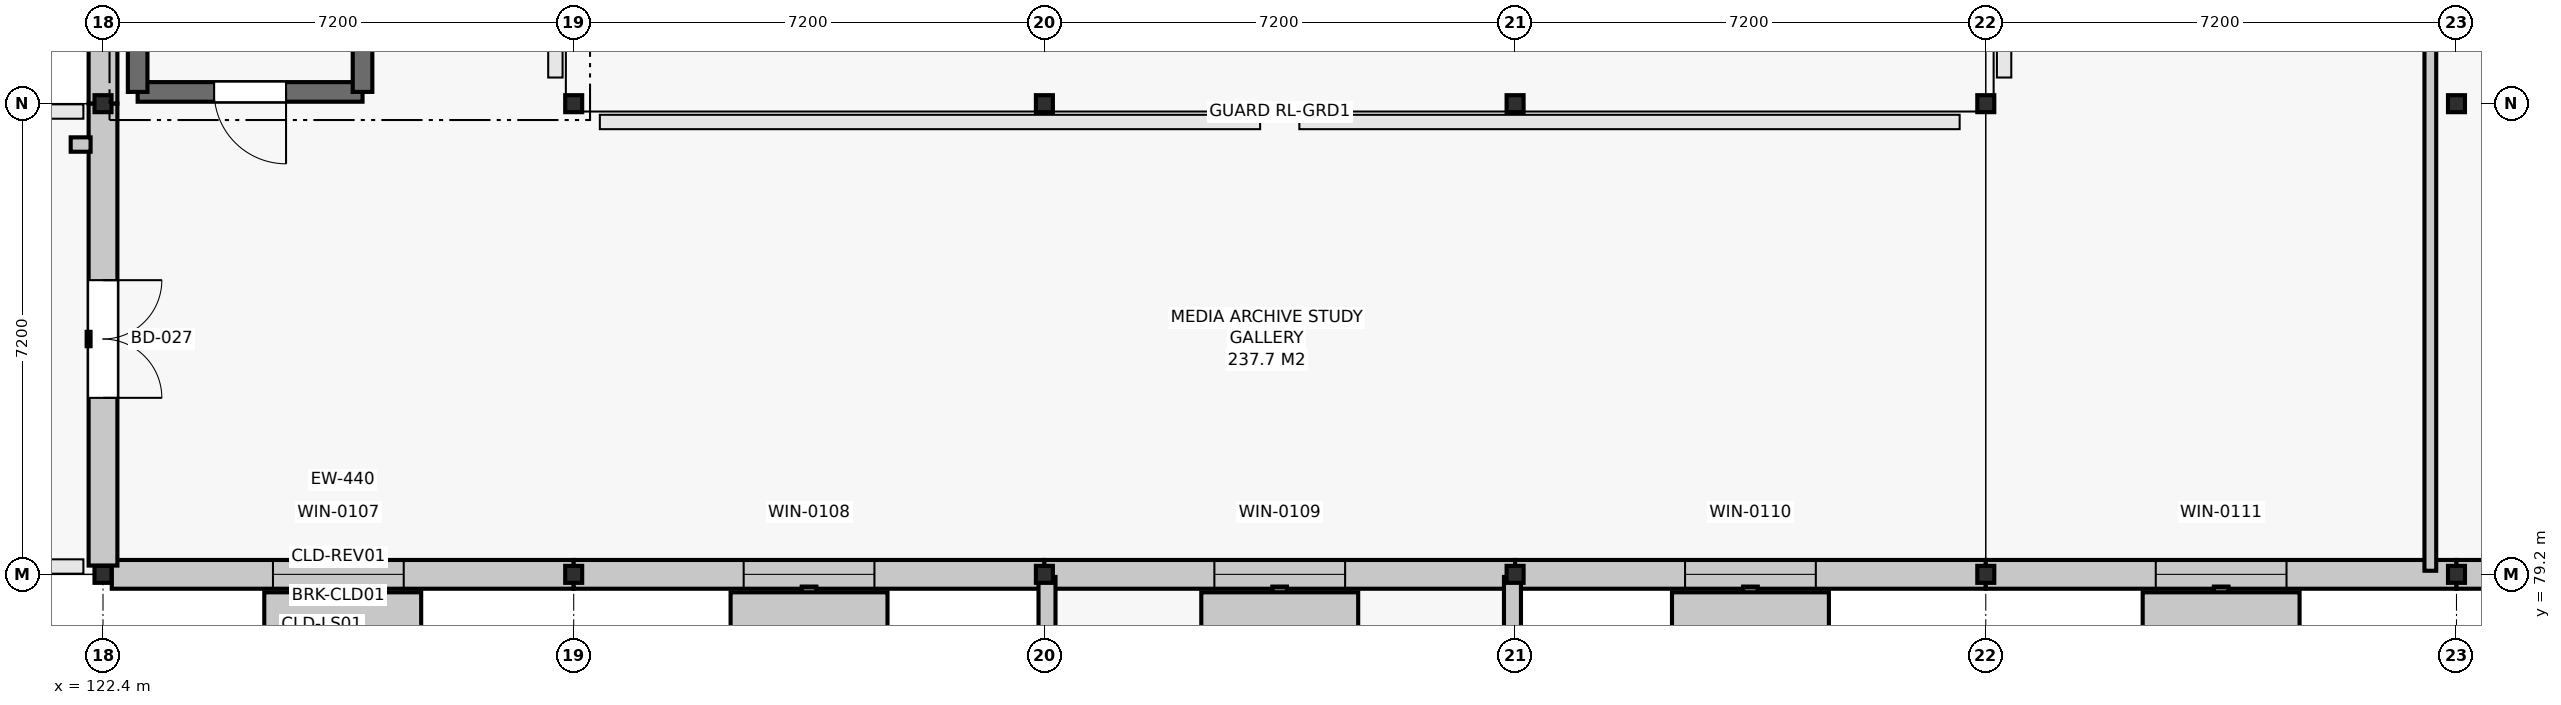
"""IFC4 building model, lengths in metres.
Left out: names, types, materials, properties, quantities, classifications, styles, units other than length and angle.
Written with IfcOpenShell. Run it as: python <this file> out.ifc"""

import sys

from ifc_helpers import new_model, si_unit, direction, frame, frame_2d, origin, origin_2d, place, context, subcontext, project, spatial, rectangle, i_section, extrude, element, fill, save


model = new_model("IFC4")
c1 = context("Model", 3, precision=1e-05, world=origin(), true_north=direction((0.0, 1.0)))
c2 = subcontext(c1, "Body", "Model", "MODEL_VIEW")
j1 = project(units=[si_unit("LENGTHUNIT", "METRE"), si_unit("PLANEANGLEUNIT", "RADIAN")], contexts=[c1])
p1 = place(None, origin())
s1 = spatial("IfcSite", under=j1, at=p1, CompositionType="ELEMENT")
p2 = place(p1, origin())
s2 = spatial("IfcBuilding", under=s1, at=p2, CompositionType="ELEMENT")
p3 = place(p2, frame((0.0, 0.0, 10.2)))
s3 = spatial("IfcBuildingStorey", under=s2, at=p3, CompositionType="ELEMENT", Elevation=10.2)
for number, where, z_axis, x_axis in (
    (1, (122.4, 79.2, 0.0), (0.0, 0.0, 1.0), (1.0, 0.0, 0.0)),
    (2, (122.4, 86.4, 0.0), (0.0, 0.0, 1.0), (1.0, 0.0, 0.0)),
    (3, (129.6, 79.2, 0.0), (0.0, 0.0, 1.0), (1.0, 0.0, 0.0)),
    (4, (129.6, 86.4, 0.0), (0.0, 0.0, 1.0), (1.0, 0.0, 0.0)),
    (5, (136.8, 79.2, 0.0), (0.0, 0.0, 1.0), (1.0, 0.0, 0.0)),
    (6, (136.8, 86.4, 0.0), (0.0, 0.0, 1.0), (1.0, 0.0, 0.0)),
    (7, (144.0, 79.2, 0.0), (0.0, 0.0, 1.0), (1.0, 0.0, 0.0)),
    (8, (144.0, 86.4, 0.0), (0.0, 0.0, 1.0), (1.0, 0.0, 0.0)),
    (9, (151.2, 79.2, 0.0), (0.0, 0.0, 1.0), (1.0, 0.0, 0.0)),
    (10, (151.2, 86.4, 0.0), (0.0, 0.0, 1.0), (1.0, 0.0, 0.0)),
    (11, (158.4, 79.2, 0.0), (0.0, 0.0, 1.0), (1.0, 0.0, 0.0)),
    (12, (158.4, 86.4, 0.0), (0.0, 0.0, 1.0), (1.0, 0.0, 0.0)),
):
    element("IfcColumn", number, at=place(p3, frame(where, z_axis=z_axis, x_axis=x_axis)), inside=s3, PredefinedType="COLUMN", context=c2, shape_type="SweptSolid", body=[
        extrude(i_section(OverallWidth=0.26, OverallDepth=0.26, WebThickness=0.01, FlangeThickness=0.018, FilletRadius=0.024, at=origin_2d()), origin(), (0.0, 0.0, 1.0), 4.2),
    ])
p4 = place(p3, frame((122.534, 79.2, 0.0), z_axis=(0.0, 0.0, 1.0), x_axis=(1.0, 0.0, 0.0)))
e13 = element("IfcWall", 13, at=p4, inside=s3, PredefinedType="SOLIDWALL", context=c2, shape_type="SweptSolid", body=[
    extrude(rectangle(XDim=7.066, YDim=0.44, at=frame_2d((3.533, 0.0))), origin(), (0.0, 0.0, 1.0), 3.24),
])
p5 = place(p4, frame((2.466, 0.0, 1.35)))
e14 = element("IfcOpeningElement", 14, at=p5, cuts=e13, PredefinedType="OPENING", context=c2, shape_type="SweptSolid", body=[
    extrude(rectangle(XDim=2.0, YDim=1.5, at=frame_2d((1.0, 0.75))), frame((0.0, 0.232, 0.0), z_axis=(0.0, -1.0, 0.0), x_axis=(1.0, 0.0, 0.0)), (0.0, 0.0, 1.0), 0.464),
])
p6 = place(p3, frame((129.6, 79.2, 0.0), z_axis=(0.0, 0.0, 1.0), x_axis=(1.0, 0.0, 0.0)))
e15 = element("IfcWall", 15, at=p6, inside=s3, PredefinedType="SOLIDWALL", context=c2, shape_type="SweptSolid", body=[
    extrude(rectangle(XDim=7.2, YDim=0.44, at=frame_2d((3.6, 0.0))), origin(), (0.0, 0.0, 1.0), 3.24),
])
p7 = place(p6, frame((2.6, 0.0, 1.35)))
e16 = element("IfcOpeningElement", 16, at=p7, cuts=e15, PredefinedType="OPENING", context=c2, shape_type="SweptSolid", body=[
    extrude(rectangle(XDim=2.0, YDim=1.5, at=frame_2d((1.0, 0.75))), frame((0.0, 0.232, 0.0), z_axis=(0.0, -1.0, 0.0), x_axis=(1.0, 0.0, 0.0)), (0.0, 0.0, 1.0), 0.464),
])
p8 = place(p3, frame((136.8, 79.2, 0.0), z_axis=(0.0, 0.0, 1.0), x_axis=(1.0, 0.0, 0.0)))
e17 = element("IfcWall", 17, at=p8, inside=s3, PredefinedType="SOLIDWALL", context=c2, shape_type="SweptSolid", body=[
    extrude(rectangle(XDim=7.2, YDim=0.44, at=frame_2d((3.6, 0.0))), origin(), (0.0, 0.0, 1.0), 3.24),
])
p9 = place(p8, frame((2.6, 0.0, 1.35)))
e18 = element("IfcOpeningElement", 18, at=p9, cuts=e17, PredefinedType="OPENING", context=c2, shape_type="SweptSolid", body=[
    extrude(rectangle(XDim=2.0, YDim=1.5, at=frame_2d((1.0, 0.75))), frame((0.0, 0.232, 0.0), z_axis=(0.0, -1.0, 0.0), x_axis=(1.0, 0.0, 0.0)), (0.0, 0.0, 1.0), 0.464),
])
p10 = place(p3, frame((144.0, 79.2, 0.0), z_axis=(0.0, 0.0, 1.0), x_axis=(1.0, 0.0, 0.0)))
e19 = element("IfcWall", 19, at=p10, inside=s3, PredefinedType="SOLIDWALL", context=c2, shape_type="SweptSolid", body=[
    extrude(rectangle(XDim=7.2, YDim=0.44, at=frame_2d((3.6, 0.0))), origin(), (0.0, 0.0, 1.0), 3.24),
])
p11 = place(p10, frame((2.6, 0.0, 1.35)))
e20 = element("IfcOpeningElement", 20, at=p11, cuts=e19, PredefinedType="OPENING", context=c2, shape_type="SweptSolid", body=[
    extrude(rectangle(XDim=2.0, YDim=1.5, at=frame_2d((1.0, 0.75))), frame((0.0, 0.232, 0.0), z_axis=(0.0, -1.0, 0.0), x_axis=(1.0, 0.0, 0.0)), (0.0, 0.0, 1.0), 0.464),
])
p12 = place(p3, frame((151.2, 79.2, 0.0), z_axis=(0.0, 0.0, 1.0), x_axis=(1.0, 0.0, 0.0)))
e21 = element("IfcWall", 21, at=p12, inside=s3, PredefinedType="SOLIDWALL", context=c2, shape_type="SweptSolid", body=[
    extrude(rectangle(XDim=7.2, YDim=0.44, at=frame_2d((3.6, 0.0))), origin(), (0.0, 0.0, 1.0), 3.24),
])
p13 = place(p12, frame((2.6, 0.0, 1.35)))
e22 = element("IfcOpeningElement", 22, at=p13, cuts=e21, PredefinedType="OPENING", context=c2, shape_type="SweptSolid", body=[
    extrude(rectangle(XDim=2.0, YDim=1.5, at=frame_2d((1.0, 0.75))), frame((0.0, 0.232, 0.0), z_axis=(0.0, -1.0, 0.0), x_axis=(1.0, 0.0, 0.0)), (0.0, 0.0, 1.0), 0.464),
])
p14 = place(p3, frame((158.4, 79.2, 0.0), z_axis=(0.0, 0.0, 1.0), x_axis=(1.0, 0.0, 0.0)))
e23 = element("IfcWall", 23, at=p14, inside=s3, PredefinedType="SOLIDWALL", context=c2, shape_type="SweptSolid", body=[
    extrude(rectangle(XDim=7.066, YDim=0.44, at=frame_2d((3.533, 0.0))), origin(), (0.0, 0.0, 1.0), 3.24),
])
p15 = place(p14, frame((2.6, 0.0, 1.35)))
e24 = element("IfcOpeningElement", 24, at=p15, cuts=e23, PredefinedType="OPENING", context=c2, shape_type="SweptSolid", body=[
    extrude(rectangle(XDim=2.0, YDim=1.5, at=frame_2d((1.0, 0.75))), frame((0.0, 0.232, 0.0), z_axis=(0.0, -1.0, 0.0), x_axis=(1.0, 0.0, 0.0)), (0.0, 0.0, 1.0), 0.464),
])
p16 = place(p3, frame((122.4, 93.6, 0.0), z_axis=(0.0, 0.0, 1.0), x_axis=(0.0, -1.0, 0.0)))
e25 = element("IfcWall", 25, at=p16, inside=s3, PredefinedType="SOLIDWALL", context=c2, shape_type="SweptSolid", body=[
    extrude(rectangle(XDim=7.2, YDim=0.44, at=frame_2d((3.6, 0.0))), origin(), (0.0, 0.0, 1.0), 3.24),
])
p17 = place(p16, frame((2.6, 0.0, 1.35)))
e26 = element("IfcOpeningElement", 26, at=p17, cuts=e25, PredefinedType="OPENING", context=c2, shape_type="SweptSolid", body=[
    extrude(rectangle(XDim=2.0, YDim=1.5, at=frame_2d((1.0, 0.75))), frame((0.0, 0.232, 0.0), z_axis=(0.0, -1.0, 0.0), x_axis=(1.0, 0.0, 0.0)), (0.0, 0.0, 1.0), 0.464),
])
p18 = place(p3, frame((122.4, 86.4, 0.0), z_axis=(0.0, 0.0, 1.0), x_axis=(0.0, -1.0, 0.0)))
e27 = element("IfcWall", 27, at=p18, inside=s3, PredefinedType="SOLIDWALL", context=c2, shape_type="SweptSolid", body=[
    extrude(rectangle(XDim=7.066, YDim=0.44, at=frame_2d((3.533, 0.0))), origin(), (0.0, 0.0, 1.0), 3.24),
])
p19 = place(p18, frame((2.7, 0.0, 0.0)))
e28 = element("IfcOpeningElement", 28, at=p19, cuts=e27, PredefinedType="OPENING", context=c2, shape_type="SweptSolid", body=[
    extrude(rectangle(XDim=1.8, YDim=2.3, at=frame_2d((0.9, 1.15))), frame((0.0, 0.232, 0.0), z_axis=(0.0, -1.0, 0.0), x_axis=(1.0, 0.0, 0.0)), (0.0, 0.0, 1.0), 0.464),
])
for number, where, z_axis, x_axis in (
    (29, (143.96, 50.44, 0.0), (0.0, 0.0, 1.0), (0.0, 1.0, 0.0)),
    (30, (136.84, 79.16, 0.0), (0.0, 0.0, 1.0), (0.0, -1.0, 0.0)),
):
    element("IfcWall", number, at=place(p3, frame(where, z_axis=z_axis, x_axis=x_axis)), inside=s3, PredefinedType="PARAPET", context=c2, shape_type="SweptSolid", body=[
        extrude(rectangle(XDim=28.72, YDim=0.26, at=frame_2d((14.36, 0.0))), origin(), (0.0, 0.0, 1.0), 0.9),
    ])
p20 = place(p3, frame((122.93, 86.58, 0.0), z_axis=(0.0, 0.0, 1.0), x_axis=(1.0, 0.0, 0.0)))
e31 = element("IfcWall", 31, at=p20, inside=s3, PredefinedType="SHEAR", context=c2, shape_type="SweptSolid", body=[
    extrude(rectangle(XDim=3.44, YDim=0.3, at=frame_2d((1.72, 0.0))), origin(), (0.0, 0.0, 1.0), 3.96),
])
p21 = place(p20, frame((1.17, 0.0, 0.0)))
e32 = element("IfcOpeningElement", 32, at=p21, cuts=e31, PredefinedType="OPENING", context=c2, shape_type="SweptSolid", body=[
    extrude(rectangle(XDim=1.1, YDim=2.15, at=frame_2d((0.55, 1.075))), frame((0.0, 0.162, 0.0), z_axis=(0.0, -1.0, 0.0), x_axis=(1.0, 0.0, 0.0)), (0.0, 0.0, 1.0), 0.324),
])
for number, where, z_axis, x_axis in (
    (33, (126.37, 86.58, 0.0), (0.0, 0.0, 1.0), (0.0, 1.0, 0.0)),
    (34, (122.93, 93.52, 0.0), (0.0, 0.0, 1.0), (0.0, -1.0, 0.0)),
):
    element("IfcWall", number, at=place(p3, frame(where, z_axis=z_axis, x_axis=x_axis)), inside=s3, PredefinedType="SHEAR", context=c2, shape_type="SweptSolid", body=[
        extrude(rectangle(XDim=6.94, YDim=0.3, at=frame_2d((3.47, 0.0))), origin(), (0.0, 0.0, 1.0), 3.96),
    ])
p22 = place(p3, frame((158.0, 79.255, 0.0), z_axis=(0.0, 0.0, 1.0), x_axis=(0.0, 1.0, 0.0)))
e35 = element("IfcWall", 35, at=p22, inside=s3, PredefinedType="PARTITIONING", context=c2, shape_type="SweptSolid", body=[
    extrude(rectangle(XDim=19.653, YDim=0.18, at=frame_2d((9.827, 0.0))), origin(), (0.0, 0.0, 1.0), 3.395),
])
p23 = place(p22, frame((12.739, 0.0, 0.0)))
e36 = element("IfcOpeningElement", 36, at=p23, cuts=e35, PredefinedType="OPENING", context=c2, shape_type="SweptSolid", body=[
    extrude(rectangle(XDim=1.08, YDim=2.2, at=frame_2d((0.54, 1.1))), frame((0.0, 0.102, 0.0), z_axis=(0.0, -1.0, 0.0), x_axis=(1.0, 0.0, 0.0)), (0.0, 0.0, 1.0), 0.204),
])
p24 = place(p5, origin())
e37 = element("IfcWindow", 37, at=p24, inside=s3, PartitioningType="SINGLE_PANEL", PredefinedType="WINDOW", context=c2, shape_type="SweptSolid", body=[
    extrude(rectangle(XDim=2.0, YDim=1.5, at=frame_2d((1.0, 0.75))), frame((0.0, 0.03, 0.0), z_axis=(0.0, -1.0, 0.0), x_axis=(1.0, 0.0, 0.0)), (0.0, 0.0, 1.0), 0.06),
])
fill(e14, e37)
p25 = place(p7, origin())
e38 = element("IfcWindow", 38, at=p25, inside=s3, PartitioningType="SINGLE_PANEL", PredefinedType="WINDOW", context=c2, shape_type="SweptSolid", body=[
    extrude(rectangle(XDim=2.0, YDim=1.5, at=frame_2d((1.0, 0.75))), frame((0.0, 0.03, 0.0), z_axis=(0.0, -1.0, 0.0), x_axis=(1.0, 0.0, 0.0)), (0.0, 0.0, 1.0), 0.06),
])
fill(e16, e38)
p26 = place(p9, origin())
e39 = element("IfcWindow", 39, at=p26, inside=s3, PartitioningType="SINGLE_PANEL", PredefinedType="WINDOW", context=c2, shape_type="SweptSolid", body=[
    extrude(rectangle(XDim=2.0, YDim=1.5, at=frame_2d((1.0, 0.75))), frame((0.0, 0.03, 0.0), z_axis=(0.0, -1.0, 0.0), x_axis=(1.0, 0.0, 0.0)), (0.0, 0.0, 1.0), 0.06),
])
fill(e18, e39)
p27 = place(p11, origin())
e40 = element("IfcWindow", 40, at=p27, inside=s3, PartitioningType="SINGLE_PANEL", PredefinedType="WINDOW", context=c2, shape_type="SweptSolid", body=[
    extrude(rectangle(XDim=2.0, YDim=1.5, at=frame_2d((1.0, 0.75))), frame((0.0, 0.03, 0.0), z_axis=(0.0, -1.0, 0.0), x_axis=(1.0, 0.0, 0.0)), (0.0, 0.0, 1.0), 0.06),
])
fill(e20, e40)
p28 = place(p13, origin())
e41 = element("IfcWindow", 41, at=p28, inside=s3, PartitioningType="SINGLE_PANEL", PredefinedType="WINDOW", context=c2, shape_type="SweptSolid", body=[
    extrude(rectangle(XDim=2.0, YDim=1.5, at=frame_2d((1.0, 0.75))), frame((0.0, 0.03, 0.0), z_axis=(0.0, -1.0, 0.0), x_axis=(1.0, 0.0, 0.0)), (0.0, 0.0, 1.0), 0.06),
])
fill(e22, e41)
p29 = place(p19, origin())
e42 = element("IfcDoor", 42, at=p29, inside=s3, OperationType="DOUBLE_DOOR_SINGLE_SWING", PredefinedType="DOOR", context=c2, shape_type="SweptSolid", body=[
    extrude(rectangle(XDim=1.8, YDim=2.3, at=frame_2d((0.9, 1.15))), frame((0.0, 0.025, 0.0), z_axis=(0.0, -1.0, 0.0), x_axis=(1.0, 0.0, 0.0)), (0.0, 0.0, 1.0), 0.05),
])
fill(e28, e42)
p30 = place(p21, frame((1.1, 0.0, 0.0), z_axis=(0.0, 0.0, 1.0), x_axis=(-1.0, 0.0, 0.0)))
e43 = element("IfcDoor", 43, at=p30, inside=s3, OperationType="SINGLE_SWING_LEFT", PredefinedType="DOOR", context=c2, shape_type="SweptSolid", body=[
    extrude(rectangle(XDim=1.1, YDim=2.15, at=frame_2d((0.55, 1.075))), frame((0.0, 0.025, 0.0), z_axis=(0.0, -1.0, 0.0), x_axis=(1.0, 0.0, 0.0)), (0.0, 0.0, 1.0), 0.05),
])
fill(e32, e43)
save(model, sys.argv[1])
